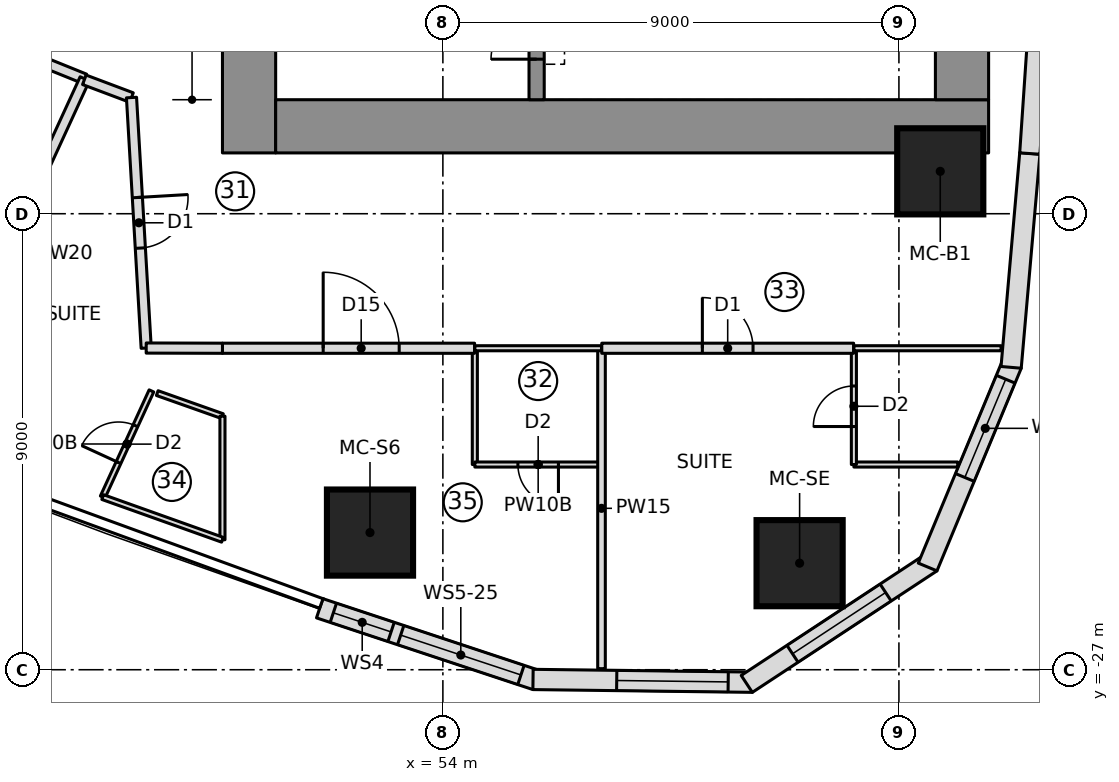
"""IFC4 building model, lengths in metres.
Left out: names, types, materials, properties, quantities, classifications, styles, units other than length and angle.
Written with IfcOpenShell. Run it as: python <this file> out.ifc"""

import sys

from ifc_helpers import new_model, si_unit, direction, frame, frame_2d, origin, origin_2d, place, context, subcontext, project, spatial, polyline, rectangle, outline, extrude, element, fill, save


model = new_model("IFC4")
c1 = context("Model", 3, precision=1e-05, world=origin(), true_north=direction((0.0, 1.0)))
c2 = subcontext(c1, "Body", "Model", "MODEL_VIEW")
j1 = project(units=[si_unit("LENGTHUNIT", "METRE"), si_unit("PLANEANGLEUNIT", "RADIAN")], contexts=[c1])
p1 = place(None, origin())
s1 = spatial("IfcSite", under=j1, at=p1, CompositionType="ELEMENT")
p2 = place(p1, origin())
s2 = spatial("IfcBuilding", under=s1, at=p2, CompositionType="ELEMENT")
p3 = place(p2, frame((0.0, 0.0, 95.55)))
s3 = spatial("IfcBuildingStorey", under=s2, at=p3, CompositionType="ELEMENT", Elevation=95.55)
p4 = place(p3, frame((50.175, -16.8, 0.0), z_axis=(0.0, 0.0, 1.0), x_axis=(0.0, 1.0, 0.0)))
e1 = element("IfcWall", 1, at=p4, inside=s3, PredefinedType="SHEAR", context=c2, shape_type="SweptSolid", body=[
    extrude(rectangle(XDim=10.15, YDim=1.05, at=frame_2d((5.075, 0.0))), origin(), (0.0, 0.0, 1.0), 3.55),
])
p5 = place(p4, frame((2.55, 0.0, 0.0)))
e2 = element("IfcOpeningElement", 2, at=p5, cuts=e1, PredefinedType="OPENING", context=c2, shape_type="SweptSolid", body=[
    extrude(rectangle(XDim=1.1, YDim=2.1, at=frame_2d((0.55, 1.05))), frame((0.0, 0.535, 0.0), z_axis=(0.0, -1.0, 0.0), x_axis=(1.0, 0.0, 0.0)), (0.0, 0.0, 1.0), 1.07),
])
p6 = place(p3, frame((50.7, -16.275, 0.0), z_axis=(0.0, 0.0, 1.0), x_axis=(1.0, 0.0, 0.0)))
e3 = element("IfcWall", 3, at=p6, inside=s3, PredefinedType="SHEAR", context=c2, shape_type="SweptSolid", body=[
    extrude(rectangle(XDim=14.07, YDim=1.05, at=frame_2d((7.035, 0.0))), origin(), (0.0, 0.0, 1.0), 3.55),
])
p7 = place(p3, frame((64.245, -15.75, 0.0), z_axis=(0.0, 0.0, 1.0), x_axis=(0.0, 1.0, 0.0)))
e4 = element("IfcWall", 4, at=p7, inside=s3, PredefinedType="SHEAR", context=c2, shape_type="SweptSolid", body=[
    extrude(rectangle(XDim=6.361, YDim=1.05, at=frame_2d((3.181, 0.0))), origin(), (0.0, 0.0, 1.0), 3.55),
])
p8 = place(p3, frame((55.85, -15.75, 0.0), z_axis=(0.0, 0.0, 1.0), x_axis=(0.0, 1.0, 0.0)))
e5 = element("IfcWall", 5, at=p8, inside=s3, PredefinedType="SHEAR", context=c2, shape_type="SweptSolid", body=[
    extrude(rectangle(XDim=5.4, YDim=0.3, at=frame_2d((2.7, 0.0))), origin(), (0.0, 0.0, 1.0), 3.55),
])
p9 = place(p8, frame((3.6, 0.0, 0.0)))
e6 = element("IfcOpeningElement", 6, at=p9, cuts=e5, PredefinedType="OPENING", context=c2, shape_type="SweptSolid", body=[
    extrude(rectangle(XDim=1.1, YDim=2.1, at=frame_2d((0.55, 1.05))), frame((0.0, 0.16, 0.0), z_axis=(0.0, -1.0, 0.0), x_axis=(1.0, 0.0, 0.0)), (0.0, 0.0, 1.0), 0.32),
])
p10 = place(p8, frame((0.8, 0.0, 0.0)))
e7 = element("IfcOpeningElement", 7, at=p10, cuts=e5, PredefinedType="OPENING", context=c2, shape_type="SweptSolid", body=[
    extrude(rectangle(XDim=0.9, YDim=2.1, at=frame_2d((0.45, 1.05))), frame((0.0, 0.16, 0.0), z_axis=(0.0, -1.0, 0.0), x_axis=(1.0, 0.0, 0.0)), (0.0, 0.0, 1.0), 0.32),
])
for number, where, z_axis, x_axis in (
    (8, (52.562, -24.293, 0.0), (0.0, 0.0, 1.0), (1.0, 0.0, 0.0)),
    (9, (61.04, -24.897, 0.0), (0.0, 0.0, 1.0), (1.0, 0.0, 0.0)),
    (10, (63.816, -17.164, 0.0), (0.0, 0.0, 1.0), (1.0, 0.0, 0.0)),
):
    element("IfcColumn", number, at=place(p3, frame(where, z_axis=z_axis, x_axis=x_axis)), inside=s3, PredefinedType="COLUMN", context=c2, shape_type="SweptSolid", body=[
        extrude(rectangle(XDim=1.7, YDim=1.7, at=origin_2d()), origin(), (0.0, 0.0, 1.0), 3.55),
    ])
p11 = place(p3, frame((51.569, -25.787, 0.0), z_axis=(0.0, 0.0, 1.0), x_axis=(0.94925004851, -0.314522408429, 0.0)))
e11 = element("IfcWall", 11, at=p11, inside=s3, PredefinedType="NOTDEFINED", context=c2, shape_type="SweptSolid", body=[
    extrude(outline(polyline([(0.0, -0.2), (4.499, -0.2), (4.437, 0.2), (0.0, 0.2), (0.0, -0.2)])), origin(), (0.0, 0.0, 1.0), 3.25),
])
p12 = place(p11, frame((0.284, 0.0, 0.9)))
e12 = element("IfcOpeningElement", 12, at=p12, cuts=e11, PredefinedType="OPENING", context=c2, shape_type="SweptSolid", body=[
    extrude(rectangle(XDim=1.2, YDim=1.8, at=frame_2d((0.6, 0.9))), frame((0.0, 0.21, 0.0), z_axis=(0.0, -1.0, 0.0), x_axis=(1.0, 0.0, 0.0)), (0.0, 0.0, 1.0), 0.42),
])
p13 = place(p11, frame((1.684, 0.0, 0.9)))
e13 = element("IfcOpeningElement", 13, at=p13, cuts=e11, PredefinedType="OPENING", context=c2, shape_type="SweptSolid", body=[
    extrude(rectangle(XDim=2.5, YDim=1.8, at=frame_2d((1.25, 0.9))), frame((0.0, 0.21, 0.0), z_axis=(0.0, -1.0, 0.0), x_axis=(1.0, 0.0, 0.0)), (0.0, 0.0, 1.0), 0.42),
])
p14 = place(p3, frame((55.81, -27.192, 0.0), z_axis=(0.0, 0.0, 1.0), x_axis=(0.999919718849, -0.012671063772, 0.0)))
e14 = element("IfcWall", 14, at=p14, inside=s3, PredefinedType="NOTDEFINED", context=c2, shape_type="SweptSolid", body=[
    extrude(outline(polyline([(-0.031, -0.2), (4.3, -0.2), (4.177, 0.2), (0.031, 0.2), (-0.031, -0.2)])), origin(), (0.0, 0.0, 1.0), 3.25),
])
p15 = place(p14, frame((1.621, 0.0, 0.6)))
e15 = element("IfcOpeningElement", 15, at=p15, cuts=e14, PredefinedType="OPENING", context=c2, shape_type="SweptSolid", body=[
    extrude(outline(polyline([(0.0, 1.35), (0.084, 1.771), (0.322, 2.128), (0.679, 2.366), (1.1, 2.45), (1.521, 2.366), (1.878, 2.128), (2.116, 1.771), (2.2, 1.35), (2.2, 1.1), (2.116, 0.679), (1.878, 0.322), (1.521, 0.084), (1.1, 0.0), (0.679, 0.084), (0.322, 0.322), (0.084, 0.679), (0.0, 1.1), (0.0, 1.35)])), frame((0.0, 0.21, 0.0), z_axis=(0.0, -1.0, 0.0), x_axis=(1.0, 0.0, 0.0)), (0.0, 0.0, 1.0), 0.42),
])
p16 = place(p3, frame((60.049, -27.246, 0.0), z_axis=(0.0, 0.0, 1.0), x_axis=(0.835340523653, 0.549732852887, 0.0)))
e16 = element("IfcWall", 16, at=p16, inside=s3, PredefinedType="NOTDEFINED", context=c2, shape_type="SweptSolid", body=[
    extrude(outline(polyline([(-0.061, -0.2), (4.3, -0.2), (4.178, 0.2), (0.061, 0.2), (-0.061, -0.2)])), origin(), (0.0, 0.0, 1.0), 3.25),
])
p17 = place(p16, frame((1.02, 0.0, 0.6)))
e17 = element("IfcOpeningElement", 17, at=p17, cuts=e16, PredefinedType="OPENING", context=c2, shape_type="SweptSolid", body=[
    extrude(outline(polyline([(0.0, 1.35), (0.084, 1.771), (0.322, 2.128), (0.679, 2.366), (1.1, 2.45), (1.521, 2.366), (1.878, 2.128), (2.116, 1.771), (2.2, 1.35), (2.2, 1.1), (2.116, 0.679), (1.878, 0.322), (1.521, 0.084), (1.1, 0.0), (0.679, 0.084), (0.322, 0.322), (0.084, 0.679), (0.0, 1.1), (0.0, 1.35)])), frame((0.0, 0.21, 0.0), z_axis=(0.0, -1.0, 0.0), x_axis=(1.0, 0.0, 0.0)), (0.0, 0.0, 1.0), 0.42),
])
p18 = place(p3, frame((63.59, -24.916, 0.0), z_axis=(0.0, 0.0, 1.0), x_axis=(0.383997751971, 0.923334027577, 0.0)))
e18 = element("IfcWall", 18, at=p18, inside=s3, PredefinedType="NOTDEFINED", context=c2, shape_type="SweptSolid", body=[
    extrude(outline(polyline([(-0.061, -0.2), (4.27, -0.2), (4.208, 0.2), (0.061, 0.2), (-0.061, -0.2)])), origin(), (0.0, 0.0, 1.0), 3.25),
])
p19 = place(p18, frame((1.852, 0.0, 0.6)))
e19 = element("IfcOpeningElement", 19, at=p19, cuts=e18, PredefinedType="OPENING", context=c2, shape_type="SweptSolid", body=[
    extrude(outline(polyline([(0.0, 1.4), (0.08, 1.802), (0.308, 2.142), (0.648, 2.37), (1.05, 2.45), (1.452, 2.37), (1.792, 2.142), (2.02, 1.802), (2.1, 1.4), (2.1, 1.05), (2.02, 0.648), (1.792, 0.308), (1.452, 0.08), (1.05, 0.0), (0.648, 0.08), (0.308, 0.308), (0.08, 0.648), (0.0, 1.05), (0.0, 1.4)])), frame((0.0, 0.21, 0.0), z_axis=(0.0, -1.0, 0.0), x_axis=(1.0, 0.0, 0.0)), (0.0, 0.0, 1.0), 0.42),
])
p20 = place(p3, frame((65.217, -21.002, 0.0), z_axis=(0.0, 0.0, 1.0), x_axis=(0.086992730434, 0.996208946382, 0.0)))
e20 = element("IfcWall", 20, at=p20, inside=s3, PredefinedType="NOTDEFINED", context=c2, shape_type="SweptSolid", body=[
    extrude(outline(polyline([(-0.031, -0.2), (4.209, -0.2), (4.205, 0.2), (0.031, 0.2), (-0.031, -0.2)])), origin(), (0.0, 0.0, 1.0), 3.25),
])
p21 = place(p3, frame((65.583, -16.811, 0.0), z_axis=(0.0, 0.0, 1.0), x_axis=(0.067724559895, 0.997704056315, 0.0)))
e21 = element("IfcWall", 21, at=p21, inside=s3, PredefinedType="NOTDEFINED", context=c2, shape_type="SweptSolid", body=[
    extrude(outline(polyline([(-0.002, -0.2), (4.209, -0.2), (4.205, 0.2), (0.002, 0.2), (-0.002, -0.2)])), origin(), (0.0, 0.0, 1.0), 3.25),
])
p22 = place(p3, frame((54.631, -22.95, 0.0), z_axis=(0.0, 0.0, 1.0), x_axis=(0.0, 1.0, 0.0)))
e22 = element("IfcWall", 22, at=p22, inside=s3, PredefinedType="PARTITIONING", context=c2, shape_type="SweptSolid", body=[
    extrude(rectangle(XDim=2.3, YDim=0.1, at=frame_2d((1.15, 0.0))), origin(), (0.0, 0.0, 1.0), 3.25),
])
p23 = place(p3, frame((57.131, -22.95, 0.0), z_axis=(0.0, 0.0, 1.0), x_axis=(-1.0, 0.0, 0.0)))
e23 = element("IfcWall", 23, at=p23, inside=s3, PredefinedType="PARTITIONING", context=c2, shape_type="SweptSolid", body=[
    extrude(rectangle(XDim=2.5, YDim=0.1, at=frame_2d((1.25, 0.0))), origin(), (0.0, 0.0, 1.0), 3.25),
])
p24 = place(p23, frame((0.85, 0.0, 0.0)))
e24 = element("IfcOpeningElement", 24, at=p24, cuts=e23, PredefinedType="OPENING", context=c2, shape_type="SweptSolid", body=[
    extrude(rectangle(XDim=0.8, YDim=2.1, at=frame_2d((0.4, 1.05))), frame((0.0, 0.06, 0.0), z_axis=(0.0, -1.0, 0.0), x_axis=(1.0, 0.0, 0.0)), (0.0, 0.0, 1.0), 0.12),
])
p25 = place(p3, frame((64.16, -22.95, 0.0), z_axis=(0.0, 0.0, 1.0), x_axis=(-1.0, 0.0, 0.0)))
e25 = element("IfcWall", 25, at=p25, inside=s3, PredefinedType="PARTITIONING", context=c2, shape_type="SweptSolid", body=[
    extrude(rectangle(XDim=2.049, YDim=0.1, at=frame_2d((1.025, 0.0))), origin(), (0.0, 0.0, 1.0), 3.25),
])
p26 = place(p3, frame((62.111, -22.95, 0.0), z_axis=(0.0, 0.0, 1.0), x_axis=(0.0, 1.0, 0.0)))
e26 = element("IfcWall", 26, at=p26, inside=s3, PredefinedType="PARTITIONING", context=c2, shape_type="SweptSolid", body=[
    extrude(rectangle(XDim=2.3, YDim=0.1, at=frame_2d((1.15, 0.0))), origin(), (0.0, 0.0, 1.0), 3.25),
])
p27 = place(p26, frame((0.75, 0.0, 0.0)))
e27 = element("IfcOpeningElement", 27, at=p27, cuts=e26, PredefinedType="OPENING", context=c2, shape_type="SweptSolid", body=[
    extrude(rectangle(XDim=0.8, YDim=2.1, at=frame_2d((0.4, 1.05))), frame((0.0, 0.06, 0.0), z_axis=(0.0, -1.0, 0.0), x_axis=(1.0, 0.0, 0.0)), (0.0, 0.0, 1.0), 0.12),
])
p28 = place(p3, frame((57.131, -26.979, 0.0), z_axis=(0.0, 0.0, 1.0), x_axis=(0.0, 1.0, 0.0)))
e28 = element("IfcWall", 28, at=p28, inside=s3, PredefinedType="PARTITIONING", context=c2, shape_type="SweptSolid", body=[
    extrude(rectangle(XDim=6.329, YDim=0.15, at=frame_2d((3.165, 0.0))), origin(), (0.0, 0.0, 1.0), 3.25),
])
p29 = place(p3, frame((38.696, -12.007, 0.0), z_axis=(0.0, 0.0, 1.0), x_axis=(0.927027566285, -0.374993188401, 0.0)))
e29 = element("IfcWall", 29, at=p29, inside=s3, PredefinedType="PARTITIONING", context=c2, shape_type="SweptSolid", body=[
    extrude(rectangle(XDim=8.885, YDim=0.2, at=frame_2d((4.442, 0.0))), origin(), (0.0, 0.0, 1.0), 3.25),
])
p30 = place(p29, frame((3.05, 0.0, 0.0)))
e30 = element("IfcOpeningElement", 30, at=p30, cuts=e29, PredefinedType="OPENING", context=c2, shape_type="SweptSolid", body=[
    extrude(rectangle(XDim=1.0, YDim=2.1, at=frame_2d((0.5, 1.05))), frame((0.0, 0.11, 0.0), z_axis=(0.0, -1.0, 0.0), x_axis=(1.0, 0.0, 0.0)), (0.0, 0.0, 1.0), 0.22),
])
p31 = place(p3, frame((43.752, -22.262, 0.0), z_axis=(0.0, 0.0, 1.0), x_axis=(0.417437957167, 0.908705426371, 0.0)))
e31 = element("IfcWall", 31, at=p31, inside=s3, PredefinedType="PARTITIONING", context=c2, shape_type="SweptSolid", body=[
    extrude(rectangle(XDim=7.619, YDim=0.2, at=frame_2d((3.81, 0.0))), origin(), (0.0, 0.0, 1.0), 3.25),
])
p32 = place(p3, frame((48.363, -21.54, 0.0), z_axis=(0.0, 0.0, 1.0), x_axis=(0.942692856107, -0.333661773425, 0.0)))
e32 = element("IfcWall", 32, at=p32, inside=s3, PredefinedType="PARTITIONING", context=c2, shape_type="SweptSolid", body=[
    extrude(rectangle(XDim=1.365, YDim=0.1, at=frame_2d((0.683, 0.0))), origin(), (0.0, 0.0, 1.0), 3.25),
])
p33 = place(p3, frame((47.286, -23.592, 0.0), z_axis=(0.0, 0.0, 1.0), x_axis=(0.41749308293, 0.908680100864, 0.0)))
e33 = element("IfcWall", 33, at=p33, inside=s3, PredefinedType="PARTITIONING", context=c2, shape_type="SweptSolid", body=[
    extrude(rectangle(XDim=2.306, YDim=0.1, at=frame_2d((1.153, 0.0))), origin(), (0.0, 0.0, 1.0), 3.25),
])
p34 = place(p33, frame((0.75, 0.0, 0.0)))
e34 = element("IfcOpeningElement", 34, at=p34, cuts=e33, PredefinedType="OPENING", context=c2, shape_type="SweptSolid", body=[
    extrude(rectangle(XDim=0.8, YDim=2.1, at=frame_2d((0.4, 1.05))), frame((0.0, 0.06, 0.0), z_axis=(0.0, -1.0, 0.0), x_axis=(1.0, 0.0, 0.0)), (0.0, 0.0, 1.0), 0.12),
])
p35 = place(p3, frame((49.65, -20.655, 0.0), z_axis=(0.0, 0.0, 1.0), x_axis=(1.0, 0.0, 0.0)))
e35 = element("IfcWall", 35, at=p35, inside=s3, PredefinedType="PARTITIONING", context=c2, shape_type="SweptSolid", body=[
    extrude(rectangle(XDim=4.976, YDim=0.2, at=frame_2d((2.488, 0.0))), origin(), (0.0, 0.0, 1.0), 3.25),
])
p36 = place(p35, frame((1.988, 0.0, 0.0)))
e36 = element("IfcOpeningElement", 36, at=p36, cuts=e35, PredefinedType="OPENING", context=c2, shape_type="SweptSolid", body=[
    extrude(rectangle(XDim=1.5, YDim=2.1, at=frame_2d((0.75, 1.05))), frame((0.0, 0.11, 0.0), z_axis=(0.0, -1.0, 0.0), x_axis=(1.0, 0.0, 0.0)), (0.0, 0.0, 1.0), 0.22),
])
p37 = place(p3, frame((57.135, -20.655, 0.0), z_axis=(0.0, 0.0, 1.0), x_axis=(1.0, 0.0, 0.0)))
e37 = element("IfcWall", 37, at=p37, inside=s3, PredefinedType="PARTITIONING", context=c2, shape_type="SweptSolid", body=[
    extrude(rectangle(XDim=4.971, YDim=0.2, at=frame_2d((2.485, 0.0))), origin(), (0.0, 0.0, 1.0), 3.25),
])
p38 = place(p37, frame((1.985, 0.0, 0.0)))
e38 = element("IfcOpeningElement", 38, at=p38, cuts=e37, PredefinedType="OPENING", context=c2, shape_type="SweptSolid", body=[
    extrude(rectangle(XDim=1.0, YDim=2.1, at=frame_2d((0.5, 1.05))), frame((0.0, 0.11, 0.0), z_axis=(0.0, -1.0, 0.0), x_axis=(1.0, 0.0, 0.0)), (0.0, 0.0, 1.0), 0.22),
])
p39 = place(p3, frame((54.631, -20.655, 0.0), z_axis=(0.0, 0.0, 1.0), x_axis=(1.0, 0.0, 0.0)))
e39 = element("IfcWall", 39, at=p39, inside=s3, PredefinedType="PARTITIONING", context=c2, shape_type="SweptSolid", body=[
    extrude(rectangle(XDim=2.5, YDim=0.1, at=frame_2d((1.25, 0.0))), origin(), (0.0, 0.0, 1.0), 3.25),
])
p40 = place(p3, frame((62.111, -20.655, 0.0), z_axis=(0.0, 0.0, 1.0), x_axis=(1.0, 0.0, 0.0)))
e40 = element("IfcWall", 40, at=p40, inside=s3, PredefinedType="PARTITIONING", context=c2, shape_type="SweptSolid", body=[
    extrude(rectangle(XDim=2.906, YDim=0.1, at=frame_2d((1.453, 0.0))), origin(), (0.0, 0.0, 1.0), 3.25),
])
p41 = place(p3, frame((49.65, -21.996, 0.0), z_axis=(0.0, 0.0, 1.0), x_axis=(0.0, -1.0, 0.0)))
e41 = element("IfcWall", 41, at=p41, inside=s3, PredefinedType="PARTITIONING", context=c2, shape_type="SweptSolid", body=[
    extrude(rectangle(XDim=2.439, YDim=0.1, at=frame_2d((1.22, 0.0))), origin(), (0.0, 0.0, 1.0), 3.25),
])
p42 = place(p3, frame((49.65, -24.435, 0.0), z_axis=(0.0, 0.0, 1.0), x_axis=(-0.941933231826, 0.335800218555, 0.0)))
e42 = element("IfcWall", 42, at=p42, inside=s3, PredefinedType="PARTITIONING", context=c2, shape_type="SweptSolid", body=[
    extrude(rectangle(XDim=2.51, YDim=0.1, at=frame_2d((1.255, 0.0))), origin(), (0.0, 0.0, 1.0), 3.25),
])
p43 = place(p3, frame((46.924, -15.357, 0.0), z_axis=(0.0, 0.0, 1.0), x_axis=(0.935803526171, -0.35252199989, 0.0)))
e43 = element("IfcWall", 43, at=p43, inside=s3, PredefinedType="PARTITIONING", context=c2, shape_type="SweptSolid", body=[
    extrude(rectangle(XDim=0.995, YDim=0.2, at=frame_2d((0.497, 0.0))), origin(), (0.0, 0.0, 1.0), 3.25),
])
p44 = place(p3, frame((47.855, -15.707, 0.0), z_axis=(0.0, 0.0, 1.0), x_axis=(0.058568850083, -0.998283371493, 0.0)))
e44 = element("IfcWall", 44, at=p44, inside=s3, PredefinedType="PARTITIONING", context=c2, shape_type="SweptSolid", body=[
    extrude(rectangle(XDim=4.952, YDim=0.2, at=frame_2d((2.476, 0.0))), origin(), (0.0, 0.0, 1.0), 3.25),
])
p45 = place(p44, frame((1.976, 0.0, 0.0)))
e45 = element("IfcOpeningElement", 45, at=p45, cuts=e44, PredefinedType="OPENING", context=c2, shape_type="SweptSolid", body=[
    extrude(rectangle(XDim=1.0, YDim=2.1, at=frame_2d((0.5, 1.05))), frame((0.0, 0.11, 0.0), z_axis=(0.0, -1.0, 0.0), x_axis=(1.0, 0.0, 0.0)), (0.0, 0.0, 1.0), 0.22),
])
p46 = place(p3, frame((48.145, -20.651, 0.0), z_axis=(0.0, 0.0, 1.0), x_axis=(0.999996196879, -0.002757938895, 0.0)))
e46 = element("IfcWall", 46, at=p46, inside=s3, PredefinedType="PARTITIONING", context=c2, shape_type="SweptSolid", body=[
    extrude(rectangle(XDim=1.505, YDim=0.2, at=frame_2d((0.752, 0.0))), origin(), (0.0, 0.0, 1.0), 3.25),
])
p47 = place(p12, origin())
e47 = element("IfcWindow", 47, at=p47, inside=s3, PartitioningType="SINGLE_PANEL", PredefinedType="WINDOW", context=c2, shape_type="SweptSolid", body=[
    extrude(rectangle(XDim=1.2, YDim=1.8, at=frame_2d((0.6, 0.9))), frame((0.0, 0.17, 0.0), z_axis=(0.0, -1.0, 0.0), x_axis=(1.0, 0.0, 0.0)), (0.0, 0.0, 1.0), 0.06),
])
fill(e12, e47)
p48 = place(p13, origin())
e48 = element("IfcWindow", 48, at=p48, inside=s3, PartitioningType="SINGLE_PANEL", PredefinedType="WINDOW", context=c2, shape_type="SweptSolid", body=[
    extrude(rectangle(XDim=2.5, YDim=1.8, at=frame_2d((1.25, 0.9))), frame((0.0, 0.17, 0.0), z_axis=(0.0, -1.0, 0.0), x_axis=(1.0, 0.0, 0.0)), (0.0, 0.0, 1.0), 0.06),
])
fill(e13, e48)
p49 = place(p15, origin())
e49 = element("IfcWindow", 49, at=p49, inside=s3, PartitioningType="SINGLE_PANEL", PredefinedType="WINDOW", context=c2, shape_type="SweptSolid", body=[
    extrude(outline(polyline([(0.0, 1.35), (0.084, 1.771), (0.322, 2.128), (0.679, 2.366), (1.1, 2.45), (1.521, 2.366), (1.878, 2.128), (2.116, 1.771), (2.2, 1.35), (2.2, 1.1), (2.116, 0.679), (1.878, 0.322), (1.521, 0.084), (1.1, 0.0), (0.679, 0.084), (0.322, 0.322), (0.084, 0.679), (0.0, 1.1), (0.0, 1.35)])), frame((0.0, 0.17, 0.0), z_axis=(0.0, -1.0, 0.0), x_axis=(1.0, 0.0, 0.0)), (0.0, 0.0, 1.0), 0.06),
])
fill(e15, e49)
p50 = place(p17, origin())
e50 = element("IfcWindow", 50, at=p50, inside=s3, PartitioningType="SINGLE_PANEL", PredefinedType="WINDOW", context=c2, shape_type="SweptSolid", body=[
    extrude(outline(polyline([(0.0, 1.35), (0.084, 1.771), (0.322, 2.128), (0.679, 2.366), (1.1, 2.45), (1.521, 2.366), (1.878, 2.128), (2.116, 1.771), (2.2, 1.35), (2.2, 1.1), (2.116, 0.679), (1.878, 0.322), (1.521, 0.084), (1.1, 0.0), (0.679, 0.084), (0.322, 0.322), (0.084, 0.679), (0.0, 1.1), (0.0, 1.35)])), frame((0.0, 0.17, 0.0), z_axis=(0.0, -1.0, 0.0), x_axis=(1.0, 0.0, 0.0)), (0.0, 0.0, 1.0), 0.06),
])
fill(e17, e50)
p51 = place(p19, origin())
e51 = element("IfcWindow", 51, at=p51, inside=s3, PartitioningType="SINGLE_PANEL", PredefinedType="WINDOW", context=c2, shape_type="SweptSolid", body=[
    extrude(outline(polyline([(0.0, 1.4), (0.08, 1.802), (0.308, 2.142), (0.648, 2.37), (1.05, 2.45), (1.452, 2.37), (1.792, 2.142), (2.02, 1.802), (2.1, 1.4), (2.1, 1.05), (2.02, 0.648), (1.792, 0.308), (1.452, 0.08), (1.05, 0.0), (0.648, 0.08), (0.308, 0.308), (0.08, 0.648), (0.0, 1.05), (0.0, 1.4)])), frame((0.0, 0.17, 0.0), z_axis=(0.0, -1.0, 0.0), x_axis=(1.0, 0.0, 0.0)), (0.0, 0.0, 1.0), 0.06),
])
fill(e19, e51)
p52 = place(p24, origin())
e52 = element("IfcDoor", 52, at=p52, inside=s3, OperationType="SINGLE_SWING_LEFT", PredefinedType="DOOR", context=c2, shape_type="SweptSolid", body=[
    extrude(rectangle(XDim=0.8, YDim=2.1, at=frame_2d((0.4, 1.05))), frame((0.0, 0.025, 0.0), z_axis=(0.0, -1.0, 0.0), x_axis=(1.0, 0.0, 0.0)), (0.0, 0.0, 1.0), 0.05),
])
fill(e24, e52)
p53 = place(p27, origin())
e53 = element("IfcDoor", 53, at=p53, inside=s3, OperationType="SINGLE_SWING_LEFT", PredefinedType="DOOR", context=c2, shape_type="SweptSolid", body=[
    extrude(rectangle(XDim=0.8, YDim=2.1, at=frame_2d((0.4, 1.05))), frame((0.0, 0.025, 0.0), z_axis=(0.0, -1.0, 0.0), x_axis=(1.0, 0.0, 0.0)), (0.0, 0.0, 1.0), 0.05),
])
fill(e27, e53)
p54 = place(p34, origin())
e54 = element("IfcDoor", 54, at=p54, inside=s3, OperationType="SINGLE_SWING_LEFT", PredefinedType="DOOR", context=c2, shape_type="SweptSolid", body=[
    extrude(rectangle(XDim=0.8, YDim=2.1, at=frame_2d((0.4, 1.05))), frame((0.0, 0.025, 0.0), z_axis=(0.0, -1.0, 0.0), x_axis=(1.0, 0.0, 0.0)), (0.0, 0.0, 1.0), 0.05),
])
fill(e34, e54)
p55 = place(p36, origin())
e55 = element("IfcDoor", 55, at=p55, inside=s3, OperationType="DOUBLE_DOOR_SINGLE_SWING", PredefinedType="DOOR", context=c2, shape_type="SweptSolid", body=[
    extrude(rectangle(XDim=1.5, YDim=2.1, at=frame_2d((0.75, 1.05))), frame((0.0, 0.025, 0.0), z_axis=(0.0, -1.0, 0.0), x_axis=(1.0, 0.0, 0.0)), (0.0, 0.0, 1.0), 0.05),
])
fill(e36, e55)
p56 = place(p38, origin())
e56 = element("IfcDoor", 56, at=p56, inside=s3, OperationType="SINGLE_SWING_LEFT", PredefinedType="DOOR", context=c2, shape_type="SweptSolid", body=[
    extrude(rectangle(XDim=1.0, YDim=2.1, at=frame_2d((0.5, 1.05))), frame((0.0, 0.025, 0.0), z_axis=(0.0, -1.0, 0.0), x_axis=(1.0, 0.0, 0.0)), (0.0, 0.0, 1.0), 0.05),
])
fill(e38, e56)
p57 = place(p45, origin())
e57 = element("IfcDoor", 57, at=p57, inside=s3, OperationType="SINGLE_SWING_LEFT", PredefinedType="DOOR", context=c2, shape_type="SweptSolid", body=[
    extrude(rectangle(XDim=1.0, YDim=2.1, at=frame_2d((0.5, 1.05))), frame((0.0, 0.025, 0.0), z_axis=(0.0, -1.0, 0.0), x_axis=(1.0, 0.0, 0.0)), (0.0, 0.0, 1.0), 0.05),
])
fill(e45, e57)
p58 = place(p10, origin())
e58 = element("IfcDoor", 58, at=p58, inside=s3, OperationType="SINGLE_SWING_LEFT", PredefinedType="DOOR", context=c2, shape_type="SweptSolid", body=[
    extrude(rectangle(XDim=0.9, YDim=2.1, at=frame_2d((0.45, 1.05))), frame((0.0, 0.025, 0.0), z_axis=(0.0, -1.0, 0.0), x_axis=(1.0, 0.0, 0.0)), (0.0, 0.0, 1.0), 0.05),
])
fill(e7, e58)
save(model, sys.argv[1])
